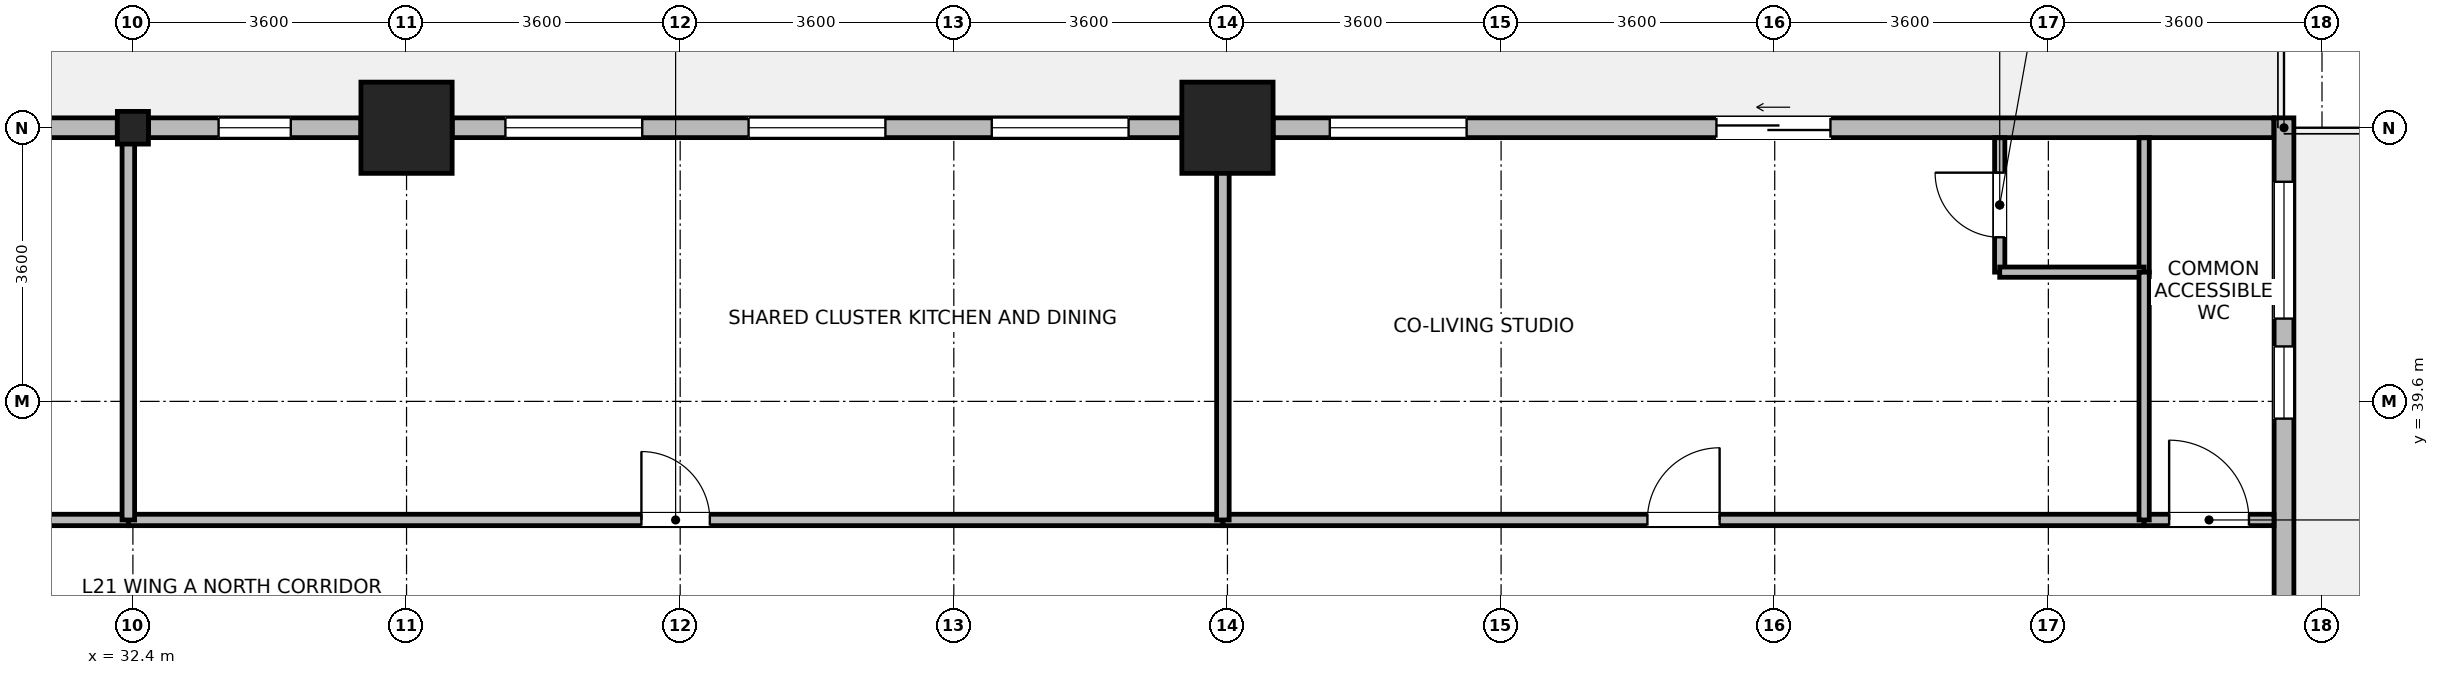
"""IFC4 building model, lengths in metres.
Left out: names, types, materials, properties, quantities, classifications, styles, units other than length and angle.
Written with IfcOpenShell. Run it as: python <this file> out.ifc"""

import sys

from ifc_helpers import new_model, si_unit, direction, frame, frame_2d, origin, origin_2d, place, context, subcontext, project, spatial, rectangle, i_section, extrude, source, transform, mapped, element, fill, save


model = new_model("IFC4")
c1 = context("Model", 3, precision=1e-05, world=origin(), true_north=direction((0.0, 1.0)))
c2 = subcontext(c1, "Body", "Model", "MODEL_VIEW")
j1 = project(units=[si_unit("LENGTHUNIT", "METRE"), si_unit("PLANEANGLEUNIT", "RADIAN")], contexts=[c1])
p1 = place(None, origin())
s1 = spatial("IfcSite", under=j1, at=p1, CompositionType="ELEMENT")
p2 = place(p1, origin())
s2 = spatial("IfcBuilding", under=s1, at=p2, CompositionType="ELEMENT")
p3 = place(p2, frame((0.0, 0.0, 86.0)))
s3 = spatial("IfcBuildingStorey", under=s2, at=p3, CompositionType="ELEMENT", Elevation=86.0)
m1 = source(origin(), c2, "Body", "SweptSolid", [
    extrude(rectangle(XDim=1.2, YDim=1.2, at=origin_2d()), origin(), (0.0, 0.0, 1.0), 3.7),
])
for number, where, z_axis, x_axis in (
    (1, (36.0, 43.2, 0.0), (0.0, 0.0, 1.0), (1.0, 0.0, 0.0)),
    (2, (46.8, 43.2, 0.0), (0.0, 0.0, 1.0), (1.0, 0.0, 0.0)),
):
    element("IfcColumn", number, at=place(p3, frame(where, z_axis=z_axis, x_axis=x_axis)), inside=s3, PredefinedType="COLUMN", context=c2, shape_type="MappedRepresentation", body=[
        mapped(m1, transform((0.0, 0.0, 0.0), x_axis=(1.0, 0.0, 0.0), y_axis=(0.0, 1.0, 0.0), z_axis=(0.0, 0.0, 1.0), scale=1.0)),
    ])
m2 = source(origin(), c2, "Body", "SweptSolid", [
    extrude(i_section(OverallWidth=0.409, OverallDepth=0.43, WebThickness=0.024, FlangeThickness=0.033, FilletRadius=0.015, at=origin_2d()), origin(), (0.0, 0.0, 1.0), 3.7),
])
p4 = place(p3, frame((32.4, 43.2, 0.0), z_axis=(0.0, 0.0, 1.0), x_axis=(1.0, 0.0, 0.0)))
e3 = element("IfcColumn", 3, at=p4, inside=s3, PredefinedType="COLUMN", context=c2, shape_type="MappedRepresentation", body=[
    mapped(m2, transform((0.0, 0.0, 0.0), x_axis=(1.0, 0.0, 0.0), y_axis=(0.0, 1.0, 0.0), z_axis=(0.0, 0.0, 1.0), scale=1.0)),
])
p5 = place(p3, frame((60.7, 43.33, 0.0), z_axis=(0.0, 0.0, 1.0), x_axis=(0.0, -1.0, 0.0)))
e4 = element("IfcWall", 4, at=p5, inside=s3, PredefinedType="STANDARD", context=c2, shape_type="SweptSolid", body=[
    extrude(rectangle(XDim=6.964, YDim=0.26, at=frame_2d((3.482, 0.0))), origin(), (0.0, 0.0, 1.0), 3.43),
])
p6 = place(p5, frame((0.841, 0.0, 0.85)))
e5 = element("IfcOpeningElement", 5, at=p6, cuts=e4, PredefinedType="OPENING", context=c2, shape_type="SweptSolid", body=[
    extrude(rectangle(XDim=1.8, YDim=1.85, at=frame_2d((0.9, 0.925))), frame((0.0, 0.14, 0.0), z_axis=(0.0, -1.0, 0.0), x_axis=(1.0, 0.0, 0.0)), (0.0, 0.0, 1.0), 0.28),
])
p7 = place(p5, frame((3.007, 0.0, 0.85)))
e6 = element("IfcOpeningElement", 6, at=p7, cuts=e4, PredefinedType="OPENING", context=c2, shape_type="SweptSolid", body=[
    extrude(rectangle(XDim=0.95, YDim=1.75, at=frame_2d((0.475, 0.875))), frame((0.0, 0.14, 0.0), z_axis=(0.0, -1.0, 0.0), x_axis=(1.0, 0.0, 0.0)), (0.0, 0.0, 1.0), 0.28),
])
p8 = place(p3, frame((47.401, 43.2, 0.0), z_axis=(0.0, 0.0, 1.0), x_axis=(1.0, 0.0, 0.0)))
e7 = element("IfcWall", 7, at=p8, inside=s3, PredefinedType="STANDARD", context=c2, shape_type="SweptSolid", body=[
    extrude(rectangle(XDim=13.164, YDim=0.26, at=frame_2d((6.582, 0.0))), origin(), (0.0, 0.0, 1.0), 3.43),
])
p9 = place(p8, frame((5.832, 0.0, 0.0)))
e8 = element("IfcOpeningElement", 8, at=p9, cuts=e7, PredefinedType="OPENING", context=c2, shape_type="SweptSolid", body=[
    extrude(rectangle(XDim=1.5, YDim=2.15, at=frame_2d((0.75, 1.075))), frame((0.0, 0.14, 0.0), z_axis=(0.0, -1.0, 0.0), x_axis=(1.0, 0.0, 0.0)), (0.0, 0.0, 1.0), 0.28),
])
p10 = place(p8, frame((0.746, 0.0, 0.85)))
e9 = element("IfcOpeningElement", 9, at=p10, cuts=e7, PredefinedType="OPENING", context=c2, shape_type="SweptSolid", body=[
    extrude(rectangle(XDim=1.8, YDim=1.85, at=frame_2d((0.9, 0.925))), frame((0.0, 0.14, 0.0), z_axis=(0.0, -1.0, 0.0), x_axis=(1.0, 0.0, 0.0)), (0.0, 0.0, 1.0), 0.28),
])
p11 = place(p3, frame((36.601, 43.2, 0.0), z_axis=(0.0, 0.0, 1.0), x_axis=(1.0, 0.0, 0.0)))
e10 = element("IfcWall", 10, at=p11, inside=s3, PredefinedType="STANDARD", context=c2, shape_type="SweptSolid", body=[
    extrude(rectangle(XDim=9.598, YDim=0.26, at=frame_2d((4.799, 0.0))), origin(), (0.0, 0.0, 1.0), 2.93),
])
p12 = place(p11, frame((0.7, 0.0, 0.85)))
e11 = element("IfcOpeningElement", 11, at=p12, cuts=e10, PredefinedType="OPENING", context=c2, shape_type="SweptSolid", body=[
    extrude(rectangle(XDim=1.8, YDim=1.85, at=frame_2d((0.9, 0.925))), frame((0.0, 0.14, 0.0), z_axis=(0.0, -1.0, 0.0), x_axis=(1.0, 0.0, 0.0)), (0.0, 0.0, 1.0), 0.28),
])
p13 = place(p11, frame((3.899, 0.0, 0.85)))
e12 = element("IfcOpeningElement", 12, at=p13, cuts=e10, PredefinedType="OPENING", context=c2, shape_type="SweptSolid", body=[
    extrude(rectangle(XDim=1.8, YDim=1.85, at=frame_2d((0.9, 0.925))), frame((0.0, 0.14, 0.0), z_axis=(0.0, -1.0, 0.0), x_axis=(1.0, 0.0, 0.0)), (0.0, 0.0, 1.0), 0.28),
])
p14 = place(p11, frame((7.098, 0.0, 0.85)))
e13 = element("IfcOpeningElement", 13, at=p14, cuts=e10, PredefinedType="OPENING", context=c2, shape_type="SweptSolid", body=[
    extrude(rectangle(XDim=1.8, YDim=1.85, at=frame_2d((0.9, 0.925))), frame((0.0, 0.14, 0.0), z_axis=(0.0, -1.0, 0.0), x_axis=(1.0, 0.0, 0.0)), (0.0, 0.0, 1.0), 0.28),
])
p15 = place(p3, frame((32.605, 43.2, 0.0), z_axis=(0.0, 0.0, 1.0), x_axis=(1.0, 0.0, 0.0)))
e14 = element("IfcWall", 14, at=p15, inside=s3, PredefinedType="STANDARD", context=c2, shape_type="SweptSolid", body=[
    extrude(rectangle(XDim=2.793, YDim=0.26, at=frame_2d((1.397, 0.0))), origin(), (0.0, 0.0, 1.0), 2.93),
])
p16 = place(p15, frame((0.922, 0.0, 0.85)))
e15 = element("IfcOpeningElement", 15, at=p16, cuts=e14, PredefinedType="OPENING", context=c2, shape_type="SweptSolid", body=[
    extrude(rectangle(XDim=0.95, YDim=1.75, at=frame_2d((0.475, 0.875))), frame((0.0, 0.14, 0.0), z_axis=(0.0, -1.0, 0.0), x_axis=(1.0, 0.0, 0.0)), (0.0, 0.0, 1.0), 0.28),
])
p17 = place(p3, frame((29.401, 43.2, 0.0), z_axis=(0.0, 0.0, 1.0), x_axis=(1.0, 0.0, 0.0)))
e16 = element("IfcWall", 16, at=p17, inside=s3, PredefinedType="STANDARD", context=c2, shape_type="SweptSolid", body=[
    extrude(rectangle(XDim=2.794, YDim=0.26, at=frame_2d((1.397, 0.0))), origin(), (0.0, 0.0, 1.0), 2.93),
])
p18 = place(p17, frame((0.922, 0.0, 0.85)))
e17 = element("IfcOpeningElement", 17, at=p18, cuts=e16, PredefinedType="OPENING", context=c2, shape_type="SweptSolid", body=[
    extrude(rectangle(XDim=0.95, YDim=1.75, at=frame_2d((0.475, 0.875))), frame((0.0, 0.14, 0.0), z_axis=(0.0, -1.0, 0.0), x_axis=(1.0, 0.0, 0.0)), (0.0, 0.0, 1.0), 0.28),
])
p19 = place(p3, frame((56.96, 41.3, 0.0), z_axis=(0.0, 0.0, 1.0), x_axis=(0.0, 1.0, 0.0)))
e18 = element("IfcWall", 18, at=p19, inside=s3, PredefinedType="PARTITIONING", context=c2, shape_type="SweptSolid", body=[
    extrude(rectangle(XDim=1.768, YDim=0.135, at=frame_2d((0.884, 0.0))), origin(), (0.0, 0.0, 1.0), 3.43),
])
p20 = place(p19, frame((0.459, 0.0, 0.0)))
e19 = element("IfcOpeningElement", 19, at=p20, cuts=e18, PredefinedType="OPENING", context=c2, shape_type="SweptSolid", body=[
    extrude(rectangle(XDim=0.85, YDim=2.04, at=frame_2d((0.425, 1.02))), frame((0.0, 0.078, 0.0), z_axis=(0.0, -1.0, 0.0), x_axis=(1.0, 0.0, 0.0)), (0.0, 0.0, 1.0), 0.155),
])
p21 = place(p3, frame((58.86, 41.3, 0.0), z_axis=(0.0, 0.0, 1.0), x_axis=(0.0, 1.0, 0.0)))
e20 = element("IfcWall", 20, at=p21, inside=s3, PredefinedType="PARTITIONING", context=c2, shape_type="SweptSolid", body=[
    extrude(rectangle(XDim=1.768, YDim=0.135, at=frame_2d((0.884, 0.0))), origin(), (0.0, 0.0, 1.0), 3.43),
])
p22 = place(p3, frame((56.96, 41.3, 0.0), z_axis=(0.0, 0.0, 1.0), x_axis=(1.0, 0.0, 0.0)))
e21 = element("IfcWall", 21, at=p22, inside=s3, PredefinedType="PARTITIONING", context=c2, shape_type="SweptSolid", body=[
    extrude(rectangle(XDim=1.9, YDim=0.135, at=frame_2d((0.95, 0.0))), origin(), (0.0, 0.0, 1.0), 3.43),
])
p23 = place(p3, frame((32.34, 38.04, 0.0), z_axis=(0.0, 0.0, 1.0), x_axis=(1.0, 0.0, 0.0)))
e22 = element("IfcWall", 22, at=p23, inside=s3, PredefinedType="PARTITIONING", context=c2, shape_type="SweptSolid", body=[
    extrude(rectangle(XDim=14.4, YDim=0.15, at=frame_2d((7.2, 0.0))), origin(), (0.0, 0.0, 1.0), 3.43),
])
p24 = place(p23, frame((6.75, 0.0, 0.0)))
e23 = element("IfcOpeningElement", 23, at=p24, cuts=e22, PredefinedType="OPENING", context=c2, shape_type="SweptSolid", body=[
    extrude(rectangle(XDim=0.9, YDim=2.08, at=frame_2d((0.45, 1.04))), frame((0.0, 0.085, 0.0), z_axis=(0.0, -1.0, 0.0), x_axis=(1.0, 0.0, 0.0)), (0.0, 0.0, 1.0), 0.17),
])
p25 = place(p3, frame((46.74, 38.04, 0.0), z_axis=(0.0, 0.0, 1.0), x_axis=(1.0, 0.0, 0.0)))
e24 = element("IfcWall", 24, at=p25, inside=s3, PredefinedType="PARTITIONING", context=c2, shape_type="SweptSolid", body=[
    extrude(rectangle(XDim=12.12, YDim=0.15, at=frame_2d((6.06, 0.0))), origin(), (0.0, 0.0, 1.0), 3.43),
])
p26 = place(p25, frame((5.585, 0.0, 0.0)))
e25 = element("IfcOpeningElement", 25, at=p26, cuts=e24, PredefinedType="OPENING", context=c2, shape_type="SweptSolid", body=[
    extrude(rectangle(XDim=0.95, YDim=2.1, at=frame_2d((0.475, 1.05))), frame((0.0, 0.085, 0.0), z_axis=(0.0, -1.0, 0.0), x_axis=(1.0, 0.0, 0.0)), (0.0, 0.0, 1.0), 0.17),
])
p27 = place(p3, frame((22.48, 38.04, 0.0), z_axis=(0.0, 0.0, 1.0), x_axis=(1.0, 0.0, 0.0)))
e26 = element("IfcWall", 26, at=p27, inside=s3, PredefinedType="PARTITIONING", context=c2, shape_type="SweptSolid", body=[
    extrude(rectangle(XDim=9.86, YDim=0.15, at=frame_2d((4.93, 0.0))), origin(), (0.0, 0.0, 1.0), 3.43),
])
p28 = place(p27, frame((4.455, 0.0, 0.0)))
e27 = element("IfcOpeningElement", 27, at=p28, cuts=e26, PredefinedType="OPENING", context=c2, shape_type="SweptSolid", body=[
    extrude(rectangle(XDim=0.95, YDim=2.1, at=frame_2d((0.475, 1.05))), frame((0.0, 0.085, 0.0), z_axis=(0.0, -1.0, 0.0), x_axis=(1.0, 0.0, 0.0)), (0.0, 0.0, 1.0), 0.17),
])
p29 = place(p3, frame((58.86, 38.04, 0.0), z_axis=(0.0, 0.0, 1.0), x_axis=(1.0, 0.0, 0.0)))
e28 = element("IfcWall", 28, at=p29, inside=s3, PredefinedType="PARTITIONING", context=c2, shape_type="SweptSolid", body=[
    extrude(rectangle(XDim=1.708, YDim=0.15, at=frame_2d((0.854, 0.0))), origin(), (0.0, 0.0, 1.0), 3.43),
])
p30 = place(p29, frame((0.329, 0.0, 0.0)))
e29 = element("IfcOpeningElement", 29, at=p30, cuts=e28, PredefinedType="OPENING", context=c2, shape_type="SweptSolid", body=[
    extrude(rectangle(XDim=1.05, YDim=2.12, at=frame_2d((0.525, 1.06))), frame((0.0, 0.085, 0.0), z_axis=(0.0, -1.0, 0.0), x_axis=(1.0, 0.0, 0.0)), (0.0, 0.0, 1.0), 0.17),
])
p31 = place(p3, frame((32.34, 38.04, 0.0), z_axis=(0.0, 0.0, 1.0), x_axis=(0.0, 1.0, 0.0)))
e30 = element("IfcWall", 30, at=p31, inside=s3, PredefinedType="PARTITIONING", context=c2, shape_type="SweptSolid", body=[
    extrude(rectangle(XDim=5.028, YDim=0.165, at=frame_2d((2.514, 0.0))), origin(), (0.0, 0.0, 1.0), 3.07),
])
p32 = place(p3, frame((46.74, 38.04, 0.0), z_axis=(0.0, 0.0, 1.0), x_axis=(0.0, 1.0, 0.0)))
e31 = element("IfcWall", 31, at=p32, inside=s3, PredefinedType="PARTITIONING", context=c2, shape_type="SweptSolid", body=[
    extrude(rectangle(XDim=5.028, YDim=0.165, at=frame_2d((2.514, 0.0))), origin(), (0.0, 0.0, 1.0), 2.93),
])
p33 = place(p3, frame((58.86, 38.04, 0.0), z_axis=(0.0, 0.0, 1.0), x_axis=(0.0, 1.0, 0.0)))
e32 = element("IfcWall", 32, at=p33, inside=s3, PredefinedType="PARTITIONING", context=c2, shape_type="SweptSolid", body=[
    extrude(rectangle(XDim=3.26, YDim=0.135, at=frame_2d((1.63, 0.0))), origin(), (0.0, 0.0, 1.0), 3.43),
])
p34 = place(p6, origin())
e33 = element("IfcWindow", 33, at=p34, inside=s3, PartitioningType="SINGLE_PANEL", PredefinedType="WINDOW", context=c2, shape_type="SweptSolid", body=[
    extrude(rectangle(XDim=1.8, YDim=1.85, at=frame_2d((0.9, 0.925))), frame((0.0, 0.03, 0.0), z_axis=(0.0, -1.0, 0.0), x_axis=(1.0, 0.0, 0.0)), (0.0, 0.0, 1.0), 0.06),
])
fill(e5, e33)
p35 = place(p7, origin())
e34 = element("IfcWindow", 34, at=p35, inside=s3, PartitioningType="SINGLE_PANEL", PredefinedType="WINDOW", context=c2, shape_type="SweptSolid", body=[
    extrude(rectangle(XDim=0.95, YDim=1.75, at=frame_2d((0.475, 0.875))), frame((0.0, 0.03, 0.0), z_axis=(0.0, -1.0, 0.0), x_axis=(1.0, 0.0, 0.0)), (0.0, 0.0, 1.0), 0.06),
])
fill(e6, e34)
p36 = place(p9, origin())
e35 = element("IfcDoor", 35, at=p36, inside=s3, OperationType="SLIDING_TO_LEFT", PredefinedType="DOOR", context=c2, shape_type="SweptSolid", body=[
    extrude(rectangle(XDim=1.5, YDim=2.15, at=frame_2d((0.75, 1.075))), frame((0.0, 0.025, 0.0), z_axis=(0.0, -1.0, 0.0), x_axis=(1.0, 0.0, 0.0)), (0.0, 0.0, 1.0), 0.05),
])
fill(e8, e35)
p37 = place(p10, origin())
e36 = element("IfcWindow", 36, at=p37, inside=s3, PartitioningType="SINGLE_PANEL", PredefinedType="WINDOW", context=c2, shape_type="SweptSolid", body=[
    extrude(rectangle(XDim=1.8, YDim=1.85, at=frame_2d((0.9, 0.925))), frame((0.0, 0.03, 0.0), z_axis=(0.0, -1.0, 0.0), x_axis=(1.0, 0.0, 0.0)), (0.0, 0.0, 1.0), 0.06),
])
fill(e9, e36)
p38 = place(p12, origin())
e37 = element("IfcWindow", 37, at=p38, inside=s3, PartitioningType="SINGLE_PANEL", PredefinedType="WINDOW", context=c2, shape_type="SweptSolid", body=[
    extrude(rectangle(XDim=1.8, YDim=1.85, at=frame_2d((0.9, 0.925))), frame((0.0, 0.03, 0.0), z_axis=(0.0, -1.0, 0.0), x_axis=(1.0, 0.0, 0.0)), (0.0, 0.0, 1.0), 0.06),
])
fill(e11, e37)
p39 = place(p13, origin())
e38 = element("IfcWindow", 38, at=p39, inside=s3, PartitioningType="SINGLE_PANEL", PredefinedType="WINDOW", context=c2, shape_type="SweptSolid", body=[
    extrude(rectangle(XDim=1.8, YDim=1.85, at=frame_2d((0.9, 0.925))), frame((0.0, 0.03, 0.0), z_axis=(0.0, -1.0, 0.0), x_axis=(1.0, 0.0, 0.0)), (0.0, 0.0, 1.0), 0.06),
])
fill(e12, e38)
p40 = place(p14, origin())
e39 = element("IfcWindow", 39, at=p40, inside=s3, PartitioningType="SINGLE_PANEL", PredefinedType="WINDOW", context=c2, shape_type="SweptSolid", body=[
    extrude(rectangle(XDim=1.8, YDim=1.85, at=frame_2d((0.9, 0.925))), frame((0.0, 0.03, 0.0), z_axis=(0.0, -1.0, 0.0), x_axis=(1.0, 0.0, 0.0)), (0.0, 0.0, 1.0), 0.06),
])
fill(e13, e39)
p41 = place(p16, origin())
e40 = element("IfcWindow", 40, at=p41, inside=s3, PartitioningType="SINGLE_PANEL", PredefinedType="WINDOW", context=c2, shape_type="SweptSolid", body=[
    extrude(rectangle(XDim=0.95, YDim=1.75, at=frame_2d((0.475, 0.875))), frame((0.0, 0.03, 0.0), z_axis=(0.0, -1.0, 0.0), x_axis=(1.0, 0.0, 0.0)), (0.0, 0.0, 1.0), 0.06),
])
fill(e15, e40)
p42 = place(p20, origin())
e41 = element("IfcDoor", 41, at=p42, inside=s3, OperationType="SINGLE_SWING_RIGHT", PredefinedType="DOOR", context=c2, shape_type="SweptSolid", body=[
    extrude(rectangle(XDim=0.85, YDim=2.04, at=frame_2d((0.425, 1.02))), frame((0.0, 0.025, 0.0), z_axis=(0.0, -1.0, 0.0), x_axis=(1.0, 0.0, 0.0)), (0.0, 0.0, 1.0), 0.05),
])
fill(e19, e41)
p43 = place(p24, origin())
e42 = element("IfcDoor", 42, at=p43, inside=s3, OperationType="SINGLE_SWING_LEFT", PredefinedType="DOOR", context=c2, shape_type="SweptSolid", body=[
    extrude(rectangle(XDim=0.9, YDim=2.08, at=frame_2d((0.45, 1.04))), frame((0.0, 0.025, 0.0), z_axis=(0.0, -1.0, 0.0), x_axis=(1.0, 0.0, 0.0)), (0.0, 0.0, 1.0), 0.05),
])
fill(e23, e42)
p44 = place(p26, origin())
e43 = element("IfcDoor", 43, at=p44, inside=s3, OperationType="SINGLE_SWING_RIGHT", PredefinedType="DOOR", context=c2, shape_type="SweptSolid", body=[
    extrude(rectangle(XDim=0.95, YDim=2.1, at=frame_2d((0.475, 1.05))), frame((0.0, 0.025, 0.0), z_axis=(0.0, -1.0, 0.0), x_axis=(1.0, 0.0, 0.0)), (0.0, 0.0, 1.0), 0.05),
])
fill(e25, e43)
p45 = place(p30, origin())
e44 = element("IfcDoor", 44, at=p45, inside=s3, OperationType="SINGLE_SWING_LEFT", PredefinedType="DOOR", context=c2, shape_type="SweptSolid", body=[
    extrude(rectangle(XDim=1.05, YDim=2.12, at=frame_2d((0.525, 1.06))), frame((0.0, 0.025, 0.0), z_axis=(0.0, -1.0, 0.0), x_axis=(1.0, 0.0, 0.0)), (0.0, 0.0, 1.0), 0.05),
])
fill(e29, e44)
save(model, sys.argv[1])
